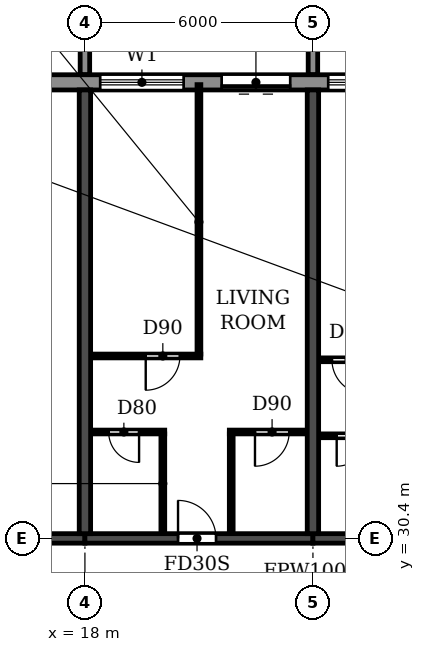
"""IFC4 building model, lengths in metres.
Left out: names, types, materials, properties, quantities, classifications, styles, units other than length and angle.
Written with IfcOpenShell. Run it as: python <this file> out.ifc"""

import sys

from ifc_helpers import new_model, si_unit, direction, frame, frame_2d, origin, place, context, subcontext, project, spatial, polyline, rectangle, outline, extrude, source, transform, mapped, element, fill, save


model = new_model("IFC4")
c1 = context("Model", 3, precision=1e-05, world=origin(), true_north=direction((0.0, 1.0)))
c2 = subcontext(c1, "Body", "Model", "MODEL_VIEW")
j1 = project(units=[si_unit("LENGTHUNIT", "METRE"), si_unit("PLANEANGLEUNIT", "RADIAN")], contexts=[c1])
p1 = place(None, origin())
s1 = spatial("IfcSite", under=j1, at=p1, CompositionType="ELEMENT")
p2 = place(p1, origin())
s2 = spatial("IfcBuilding", under=s1, at=p2, CompositionType="ELEMENT")
p3 = place(p2, frame((0.0, 0.0, 122.4)))
s3 = spatial("IfcBuildingStorey", under=s2, at=p3, CompositionType="ELEMENT", Elevation=122.4)
for number, where, z_axis, x_axis in (
    (1, (18.0, 30.525, 0.0), (0.0, 0.0, 1.0), (0.0, 1.0, 0.0)),
    (2, (24.0, 30.525, 0.0), (0.0, 0.0, 1.0), (0.0, 1.0, 0.0)),
):
    element("IfcWall", number, at=place(p3, frame(where, z_axis=z_axis, x_axis=x_axis)), inside=s3, PredefinedType="SHEAR", context=c2, shape_type="SweptSolid", body=[
        extrude(rectangle(XDim=11.675, YDim=0.3, at=frame_2d((5.837, 0.0))), origin(), (0.0, 0.0, 1.0), 3.07),
    ])
p4 = place(p3, frame((12.2, 30.4, 0.0), z_axis=(0.0, 0.0, 1.0), x_axis=(1.0, 0.0, 0.0)))
e3 = element("IfcWall", 3, at=p4, inside=s3, PredefinedType="SHEAR", context=c2, shape_type="SweptSolid", body=[
    extrude(rectangle(XDim=5.8, YDim=0.25, at=frame_2d((2.9, 0.0))), origin(), (0.0, 0.0, 1.0), 2.47),
])
p5 = place(p4, frame((2.3, 0.0, 0.0)))
e4 = element("IfcOpeningElement", 4, at=p5, cuts=e3, PredefinedType="OPENING", context=c2, shape_type="SweptSolid", body=[
    extrude(rectangle(XDim=1.0, YDim=2.1, at=frame_2d((0.5, 1.05))), frame((0.0, 0.135, 0.0), z_axis=(0.0, -1.0, 0.0), x_axis=(1.0, 0.0, 0.0)), (0.0, 0.0, 1.0), 0.27),
])
p6 = place(p3, frame((18.0, 30.4, 0.0), z_axis=(0.0, 0.0, 1.0), x_axis=(1.0, 0.0, 0.0)))
e5 = element("IfcWall", 5, at=p6, inside=s3, PredefinedType="SHEAR", context=c2, shape_type="SweptSolid", body=[
    extrude(rectangle(XDim=6.0, YDim=0.25, at=frame_2d((3.0, 0.0))), origin(), (0.0, 0.0, 1.0), 2.47),
])
p7 = place(p6, frame((2.45, 0.0, 0.0)))
e6 = element("IfcOpeningElement", 6, at=p7, cuts=e5, PredefinedType="OPENING", context=c2, shape_type="SweptSolid", body=[
    extrude(rectangle(XDim=1.0, YDim=2.1, at=frame_2d((0.5, 1.05))), frame((0.0, 0.135, 0.0), z_axis=(0.0, -1.0, 0.0), x_axis=(1.0, 0.0, 0.0)), (0.0, 0.0, 1.0), 0.27),
])
p8 = place(p3, frame((24.0, 30.4, 0.0), z_axis=(0.0, 0.0, 1.0), x_axis=(1.0, 0.0, 0.0)))
e7 = element("IfcWall", 7, at=p8, inside=s3, PredefinedType="SHEAR", context=c2, shape_type="SweptSolid", body=[
    extrude(rectangle(XDim=6.0, YDim=0.25, at=frame_2d((3.0, 0.0))), origin(), (0.0, 0.0, 1.0), 2.47),
])
p9 = place(p8, frame((2.45, 0.0, 0.0)))
e8 = element("IfcOpeningElement", 8, at=p9, cuts=e7, PredefinedType="OPENING", context=c2, shape_type="SweptSolid", body=[
    extrude(rectangle(XDim=1.0, YDim=2.1, at=frame_2d((0.5, 1.05))), frame((0.0, 0.135, 0.0), z_axis=(0.0, -1.0, 0.0), x_axis=(1.0, 0.0, 0.0)), (0.0, 0.0, 1.0), 0.27),
])
p10 = place(p3, frame((85.317, 42.4, 0.0), z_axis=(0.0, 0.0, 1.0), x_axis=(-1.0, 0.0, 0.0)))
e9 = element("IfcWall", 9, at=p10, inside=s3, PredefinedType="STANDARD", context=c2, shape_type="SweptSolid", body=[
    extrude(rectangle(XDim=68.634, YDim=0.4, at=frame_2d((34.317, 0.0))), origin(), (0.0, 0.0, 1.0), 3.07),
])
p11 = place(p10, frame((64.717, 0.0, 0.9)))
e10 = element("IfcOpeningElement", 10, at=p11, cuts=e9, PredefinedType="OPENING", context=c2, shape_type="SweptSolid", body=[
    extrude(rectangle(XDim=2.2, YDim=1.5, at=frame_2d((1.1, 0.75))), frame((0.0, 0.21, 0.0), z_axis=(0.0, -1.0, 0.0), x_axis=(1.0, 0.0, 0.0)), (0.0, 0.0, 1.0), 0.42),
])
p12 = place(p10, frame((61.917, 0.0, 0.0)))
e11 = element("IfcOpeningElement", 11, at=p12, cuts=e9, PredefinedType="OPENING", context=c2, shape_type="SweptSolid", body=[
    extrude(rectangle(XDim=1.8, YDim=2.4, at=frame_2d((0.9, 1.2))), frame((0.0, 0.21, 0.0), z_axis=(0.0, -1.0, 0.0), x_axis=(1.0, 0.0, 0.0)), (0.0, 0.0, 1.0), 0.42),
])
p13 = place(p10, frame((58.717, 0.0, 0.9)))
e12 = element("IfcOpeningElement", 12, at=p13, cuts=e9, PredefinedType="OPENING", context=c2, shape_type="SweptSolid", body=[
    extrude(rectangle(XDim=2.2, YDim=1.5, at=frame_2d((1.1, 0.75))), frame((0.0, 0.21, 0.0), z_axis=(0.0, -1.0, 0.0), x_axis=(1.0, 0.0, 0.0)), (0.0, 0.0, 1.0), 0.42),
])
p14 = place(p10, frame((55.917, 0.0, 0.0)))
e13 = element("IfcOpeningElement", 13, at=p14, cuts=e9, PredefinedType="OPENING", context=c2, shape_type="SweptSolid", body=[
    extrude(rectangle(XDim=1.8, YDim=2.4, at=frame_2d((0.9, 1.2))), frame((0.0, 0.21, 0.0), z_axis=(0.0, -1.0, 0.0), x_axis=(1.0, 0.0, 0.0)), (0.0, 0.0, 1.0), 0.42),
])
p15 = place(p10, frame((52.717, 0.0, 0.9)))
e14 = element("IfcOpeningElement", 14, at=p15, cuts=e9, PredefinedType="OPENING", context=c2, shape_type="SweptSolid", body=[
    extrude(rectangle(XDim=2.2, YDim=1.5, at=frame_2d((1.1, 0.75))), frame((0.0, 0.21, 0.0), z_axis=(0.0, -1.0, 0.0), x_axis=(1.0, 0.0, 0.0)), (0.0, 0.0, 1.0), 0.42),
])
p16 = place(p10, frame((49.917, 0.0, 0.0)))
e15 = element("IfcOpeningElement", 15, at=p16, cuts=e9, PredefinedType="OPENING", context=c2, shape_type="SweptSolid", body=[
    extrude(rectangle(XDim=1.8, YDim=2.4, at=frame_2d((0.9, 1.2))), frame((0.0, 0.21, 0.0), z_axis=(0.0, -1.0, 0.0), x_axis=(1.0, 0.0, 0.0)), (0.0, 0.0, 1.0), 0.42),
])
p17 = place(p10, frame((46.717, 0.0, 0.9)))
e16 = element("IfcOpeningElement", 16, at=p17, cuts=e9, PredefinedType="OPENING", context=c2, shape_type="SweptSolid", body=[
    extrude(rectangle(XDim=2.2, YDim=1.5, at=frame_2d((1.1, 0.75))), frame((0.0, 0.21, 0.0), z_axis=(0.0, -1.0, 0.0), x_axis=(1.0, 0.0, 0.0)), (0.0, 0.0, 1.0), 0.42),
])
p18 = place(p10, frame((43.917, 0.0, 0.0)))
e17 = element("IfcOpeningElement", 17, at=p18, cuts=e9, PredefinedType="OPENING", context=c2, shape_type="SweptSolid", body=[
    extrude(rectangle(XDim=1.8, YDim=2.4, at=frame_2d((0.9, 1.2))), frame((0.0, 0.21, 0.0), z_axis=(0.0, -1.0, 0.0), x_axis=(1.0, 0.0, 0.0)), (0.0, 0.0, 1.0), 0.42),
])
p19 = place(p10, frame((40.717, 0.0, 0.9)))
e18 = element("IfcOpeningElement", 18, at=p19, cuts=e9, PredefinedType="OPENING", context=c2, shape_type="SweptSolid", body=[
    extrude(rectangle(XDim=2.2, YDim=1.5, at=frame_2d((1.1, 0.75))), frame((0.0, 0.21, 0.0), z_axis=(0.0, -1.0, 0.0), x_axis=(1.0, 0.0, 0.0)), (0.0, 0.0, 1.0), 0.42),
])
p20 = place(p10, frame((37.717, 0.0, 0.9)))
e19 = element("IfcOpeningElement", 19, at=p20, cuts=e9, PredefinedType="OPENING", context=c2, shape_type="SweptSolid", body=[
    extrude(rectangle(XDim=2.2, YDim=1.5, at=frame_2d((1.1, 0.75))), frame((0.0, 0.21, 0.0), z_axis=(0.0, -1.0, 0.0), x_axis=(1.0, 0.0, 0.0)), (0.0, 0.0, 1.0), 0.42),
])
p21 = place(p10, frame((34.917, 0.0, 0.0)))
e20 = element("IfcOpeningElement", 20, at=p21, cuts=e9, PredefinedType="OPENING", context=c2, shape_type="SweptSolid", body=[
    extrude(rectangle(XDim=1.8, YDim=2.4, at=frame_2d((0.9, 1.2))), frame((0.0, 0.21, 0.0), z_axis=(0.0, -1.0, 0.0), x_axis=(1.0, 0.0, 0.0)), (0.0, 0.0, 1.0), 0.42),
])
p22 = place(p10, frame((31.717, 0.0, 0.9)))
e21 = element("IfcOpeningElement", 21, at=p22, cuts=e9, PredefinedType="OPENING", context=c2, shape_type="SweptSolid", body=[
    extrude(rectangle(XDim=2.2, YDim=1.5, at=frame_2d((1.1, 0.75))), frame((0.0, 0.21, 0.0), z_axis=(0.0, -1.0, 0.0), x_axis=(1.0, 0.0, 0.0)), (0.0, 0.0, 1.0), 0.42),
])
p23 = place(p10, frame((28.717, 0.0, 0.9)))
e22 = element("IfcOpeningElement", 22, at=p23, cuts=e9, PredefinedType="OPENING", context=c2, shape_type="SweptSolid", body=[
    extrude(rectangle(XDim=2.2, YDim=1.5, at=frame_2d((1.1, 0.75))), frame((0.0, 0.21, 0.0), z_axis=(0.0, -1.0, 0.0), x_axis=(1.0, 0.0, 0.0)), (0.0, 0.0, 1.0), 0.42),
])
p24 = place(p10, frame((25.717, 0.0, 0.9)))
e23 = element("IfcOpeningElement", 23, at=p24, cuts=e9, PredefinedType="OPENING", context=c2, shape_type="SweptSolid", body=[
    extrude(rectangle(XDim=2.2, YDim=1.5, at=frame_2d((1.1, 0.75))), frame((0.0, 0.21, 0.0), z_axis=(0.0, -1.0, 0.0), x_axis=(1.0, 0.0, 0.0)), (0.0, 0.0, 1.0), 0.42),
])
p25 = place(p10, frame((22.717, 0.0, 0.9)))
e24 = element("IfcOpeningElement", 24, at=p25, cuts=e9, PredefinedType="OPENING", context=c2, shape_type="SweptSolid", body=[
    extrude(rectangle(XDim=2.2, YDim=1.5, at=frame_2d((1.1, 0.75))), frame((0.0, 0.21, 0.0), z_axis=(0.0, -1.0, 0.0), x_axis=(1.0, 0.0, 0.0)), (0.0, 0.0, 1.0), 0.42),
])
p26 = place(p10, frame((19.917, 0.0, 0.0)))
e25 = element("IfcOpeningElement", 25, at=p26, cuts=e9, PredefinedType="OPENING", context=c2, shape_type="SweptSolid", body=[
    extrude(rectangle(XDim=1.8, YDim=2.4, at=frame_2d((0.9, 1.2))), frame((0.0, 0.21, 0.0), z_axis=(0.0, -1.0, 0.0), x_axis=(1.0, 0.0, 0.0)), (0.0, 0.0, 1.0), 0.42),
])
p27 = place(p10, frame((16.917, 0.0, 0.0)))
e26 = element("IfcOpeningElement", 26, at=p27, cuts=e9, PredefinedType="OPENING", context=c2, shape_type="SweptSolid", body=[
    extrude(rectangle(XDim=1.8, YDim=2.4, at=frame_2d((0.9, 1.2))), frame((0.0, 0.21, 0.0), z_axis=(0.0, -1.0, 0.0), x_axis=(1.0, 0.0, 0.0)), (0.0, 0.0, 1.0), 0.42),
])
p28 = place(p10, frame((13.717, 0.0, 0.9)))
e27 = element("IfcOpeningElement", 27, at=p28, cuts=e9, PredefinedType="OPENING", context=c2, shape_type="SweptSolid", body=[
    extrude(rectangle(XDim=2.2, YDim=1.5, at=frame_2d((1.1, 0.75))), frame((0.0, 0.21, 0.0), z_axis=(0.0, -1.0, 0.0), x_axis=(1.0, 0.0, 0.0)), (0.0, 0.0, 1.0), 0.42),
])
p29 = place(p10, frame((10.717, 0.0, 0.9)))
e28 = element("IfcOpeningElement", 28, at=p29, cuts=e9, PredefinedType="OPENING", context=c2, shape_type="SweptSolid", body=[
    extrude(rectangle(XDim=2.2, YDim=1.5, at=frame_2d((1.1, 0.75))), frame((0.0, 0.21, 0.0), z_axis=(0.0, -1.0, 0.0), x_axis=(1.0, 0.0, 0.0)), (0.0, 0.0, 1.0), 0.42),
])
p30 = place(p10, frame((7.717, 0.0, 0.9)))
e29 = element("IfcOpeningElement", 29, at=p30, cuts=e9, PredefinedType="OPENING", context=c2, shape_type="SweptSolid", body=[
    extrude(rectangle(XDim=2.2, YDim=1.5, at=frame_2d((1.1, 0.75))), frame((0.0, 0.21, 0.0), z_axis=(0.0, -1.0, 0.0), x_axis=(1.0, 0.0, 0.0)), (0.0, 0.0, 1.0), 0.42),
])
p31 = place(p10, frame((4.917, 0.0, 0.0)))
e30 = element("IfcOpeningElement", 30, at=p31, cuts=e9, PredefinedType="OPENING", context=c2, shape_type="SweptSolid", body=[
    extrude(rectangle(XDim=1.8, YDim=2.4, at=frame_2d((0.9, 1.2))), frame((0.0, 0.21, 0.0), z_axis=(0.0, -1.0, 0.0), x_axis=(1.0, 0.0, 0.0)), (0.0, 0.0, 1.0), 0.42),
])
p32 = place(p10, frame((1.717, 0.0, 0.9)))
e31 = element("IfcOpeningElement", 31, at=p32, cuts=e9, PredefinedType="OPENING", context=c2, shape_type="SweptSolid", body=[
    extrude(rectangle(XDim=2.2, YDim=1.5, at=frame_2d((1.1, 0.75))), frame((0.0, 0.21, 0.0), z_axis=(0.0, -1.0, 0.0), x_axis=(1.0, 0.0, 0.0)), (0.0, 0.0, 1.0), 0.42),
])
m1 = source(origin(), c2, "Body", "SweptSolid", [
    extrude(outline(polyline([(0.0, 0.0), (0.25, 0.0), (0.25, 3.1), (0.0, 3.1), (0.0, 0.0)])), origin(), (0.0, 0.0, 1.0), 3.1),
])
for number, where in (
    (32, (17.875, 42.6, 0.0)),
    (33, (23.875, 42.6, 0.0)),
):
    element("IfcWall", number, at=place(p3, frame(where)), inside=s3, PredefinedType="STANDARD", context=c2, shape_type="MappedRepresentation", body=[
        mapped(m1, transform((0.0, 0.0, 0.0))),
    ])
p33 = place(p3, frame((24.16, 33.1, 0.0), z_axis=(0.0, 0.0, 1.0), x_axis=(1.0, 0.0, 0.0)))
e34 = element("IfcWall", 34, at=p33, inside=s3, PredefinedType="PARTITIONING", context=c2, shape_type="SweptSolid", body=[
    extrude(rectangle(XDim=1.94, YDim=0.1, at=frame_2d((0.97, 0.0))), origin(), (0.0, 0.0, 1.0), 3.07),
])
p34 = place(p33, frame((0.465, 0.0, 0.0)))
e35 = element("IfcOpeningElement", 35, at=p34, cuts=e34, PredefinedType="OPENING", context=c2, shape_type="SweptSolid", body=[
    extrude(rectangle(XDim=0.8, YDim=2.1, at=frame_2d((0.4, 1.05))), frame((0.0, 0.06, 0.0), z_axis=(0.0, -1.0, 0.0), x_axis=(1.0, 0.0, 0.0)), (0.0, 0.0, 1.0), 0.12),
])
p35 = place(p3, frame((18.16, 33.2, 0.0), z_axis=(0.0, 0.0, 1.0), x_axis=(1.0, 0.0, 0.0)))
e36 = element("IfcWall", 36, at=p35, inside=s3, PredefinedType="PARTITIONING", context=c2, shape_type="SweptSolid", body=[
    extrude(rectangle(XDim=1.94, YDim=0.1, at=frame_2d((0.97, 0.0))), origin(), (0.0, 0.0, 1.0), 3.07),
])
p36 = place(p35, frame((0.465, 0.0, 0.0)))
e37 = element("IfcOpeningElement", 37, at=p36, cuts=e36, PredefinedType="OPENING", context=c2, shape_type="SweptSolid", body=[
    extrude(rectangle(XDim=0.8, YDim=2.1, at=frame_2d((0.4, 1.05))), frame((0.0, 0.06, 0.0), z_axis=(0.0, -1.0, 0.0), x_axis=(1.0, 0.0, 0.0)), (0.0, 0.0, 1.0), 0.12),
])
p37 = place(p3, frame((21.8, 33.2, 0.0), z_axis=(0.0, 0.0, 1.0), x_axis=(1.0, 0.0, 0.0)))
e38 = element("IfcWall", 38, at=p37, inside=s3, PredefinedType="PARTITIONING", context=c2, shape_type="SweptSolid", body=[
    extrude(rectangle(XDim=2.04, YDim=0.1, at=frame_2d((1.02, 0.0))), origin(), (0.0, 0.0, 1.0), 3.07),
])
p38 = place(p37, frame((0.675, 0.0, 0.0)))
e39 = element("IfcOpeningElement", 39, at=p38, cuts=e38, PredefinedType="OPENING", context=c2, shape_type="SweptSolid", body=[
    extrude(rectangle(XDim=0.9, YDim=2.1, at=frame_2d((0.45, 1.05))), frame((0.0, 0.06, 0.0), z_axis=(0.0, -1.0, 0.0), x_axis=(1.0, 0.0, 0.0)), (0.0, 0.0, 1.0), 0.12),
])
p39 = place(p3, frame((24.16, 35.1, 0.0), z_axis=(0.0, 0.0, 1.0), x_axis=(1.0, 0.0, 0.0)))
e40 = element("IfcWall", 40, at=p39, inside=s3, PredefinedType="PARTITIONING", context=c2, shape_type="SweptSolid", body=[
    extrude(rectangle(XDim=2.89, YDim=0.1, at=frame_2d((1.445, 0.0))), origin(), (0.0, 0.0, 1.0), 3.07),
])
p40 = place(p39, frame((0.34, 0.0, 0.0)))
e41 = element("IfcOpeningElement", 41, at=p40, cuts=e40, PredefinedType="OPENING", context=c2, shape_type="SweptSolid", body=[
    extrude(rectangle(XDim=0.9, YDim=2.1, at=frame_2d((0.45, 1.05))), frame((0.0, 0.06, 0.0), z_axis=(0.0, -1.0, 0.0), x_axis=(1.0, 0.0, 0.0)), (0.0, 0.0, 1.0), 0.12),
])
p41 = place(p3, frame((18.16, 35.2, 0.0), z_axis=(0.0, 0.0, 1.0), x_axis=(1.0, 0.0, 0.0)))
e42 = element("IfcWall", 42, at=p41, inside=s3, PredefinedType="PARTITIONING", context=c2, shape_type="SweptSolid", body=[
    extrude(rectangle(XDim=2.89, YDim=0.1, at=frame_2d((1.445, 0.0))), origin(), (0.0, 0.0, 1.0), 3.07),
])
p42 = place(p41, frame((1.44, 0.0, 0.0)))
e43 = element("IfcOpeningElement", 43, at=p42, cuts=e42, PredefinedType="OPENING", context=c2, shape_type="SweptSolid", body=[
    extrude(rectangle(XDim=0.9, YDim=2.1, at=frame_2d((0.45, 1.05))), frame((0.0, 0.06, 0.0), z_axis=(0.0, -1.0, 0.0), x_axis=(1.0, 0.0, 0.0)), (0.0, 0.0, 1.0), 0.12),
])
p43 = place(p3, frame((20.05, 30.535, 0.0), z_axis=(0.0, 0.0, 1.0), x_axis=(0.0, 1.0, 0.0)))
e44 = element("IfcWall", 44, at=p43, inside=s3, PredefinedType="PARTITIONING", context=c2, shape_type="SweptSolid", body=[
    extrude(rectangle(XDim=2.615, YDim=0.1, at=frame_2d((1.308, 0.0))), origin(), (0.0, 0.0, 1.0), 3.07),
])
p44 = place(p3, frame((21.0, 35.25, 0.0), z_axis=(0.0, 0.0, 1.0), x_axis=(0.0, 1.0, 0.0)))
e45 = element("IfcWall", 45, at=p44, inside=s3, PredefinedType="PARTITIONING", context=c2, shape_type="SweptSolid", body=[
    extrude(rectangle(XDim=7.09, YDim=0.1, at=frame_2d((3.545, 0.0))), origin(), (0.0, 0.0, 1.0), 3.07),
])
p45 = place(p3, frame((21.85, 30.535, 0.0), z_axis=(0.0, 0.0, 1.0), x_axis=(0.0, 1.0, 0.0)))
e46 = element("IfcWall", 46, at=p45, inside=s3, PredefinedType="PARTITIONING", context=c2, shape_type="SweptSolid", body=[
    extrude(rectangle(XDim=2.615, YDim=0.1, at=frame_2d((1.308, 0.0))), origin(), (0.0, 0.0, 1.0), 3.07),
])
p46 = place(p11, origin())
e47 = element("IfcWindow", 47, at=p46, inside=s3, PartitioningType="DOUBLE_PANEL_HORIZONTAL", PredefinedType="WINDOW", context=c2, shape_type="SweptSolid", body=[
    extrude(rectangle(XDim=2.2, YDim=1.5, at=frame_2d((1.1, 0.75))), frame((0.0, 0.03, 0.0), z_axis=(0.0, -1.0, 0.0), x_axis=(1.0, 0.0, 0.0)), (0.0, 0.0, 1.0), 0.06),
])
fill(e10, e47)
p47 = place(p12, origin())
e48 = element("IfcDoor", 48, at=p47, inside=s3, OperationType="DOUBLE_DOOR_SLIDING", PredefinedType="DOOR", context=c2, shape_type="SweptSolid", body=[
    extrude(rectangle(XDim=1.8, YDim=2.4, at=frame_2d((0.9, 1.2))), frame((0.0, 0.025, 0.0), z_axis=(0.0, -1.0, 0.0), x_axis=(1.0, 0.0, 0.0)), (0.0, 0.0, 1.0), 0.05),
])
fill(e11, e48)
p48 = place(p13, origin())
e49 = element("IfcWindow", 49, at=p48, inside=s3, PartitioningType="DOUBLE_PANEL_HORIZONTAL", PredefinedType="WINDOW", context=c2, shape_type="SweptSolid", body=[
    extrude(rectangle(XDim=2.2, YDim=1.5, at=frame_2d((1.1, 0.75))), frame((0.0, 0.03, 0.0), z_axis=(0.0, -1.0, 0.0), x_axis=(1.0, 0.0, 0.0)), (0.0, 0.0, 1.0), 0.06),
])
fill(e12, e49)
p49 = place(p36, frame((0.8, 0.0, 0.0), z_axis=(0.0, 0.0, 1.0), x_axis=(-1.0, 0.0, 0.0)))
e50 = element("IfcDoor", 50, at=p49, inside=s3, OperationType="SINGLE_SWING_LEFT", PredefinedType="DOOR", context=c2, shape_type="SweptSolid", body=[
    extrude(rectangle(XDim=0.8, YDim=2.1, at=frame_2d((0.4, 1.05))), frame((0.0, 0.025, 0.0), z_axis=(0.0, -1.0, 0.0), x_axis=(1.0, 0.0, 0.0)), (0.0, 0.0, 1.0), 0.05),
])
fill(e37, e50)
p50 = place(p42, frame((0.9, 0.0, 0.0), z_axis=(0.0, 0.0, 1.0), x_axis=(-1.0, 0.0, 0.0)))
e51 = element("IfcDoor", 51, at=p50, inside=s3, OperationType="SINGLE_SWING_RIGHT", PredefinedType="DOOR", context=c2, shape_type="SweptSolid", body=[
    extrude(rectangle(XDim=0.9, YDim=2.1, at=frame_2d((0.45, 1.05))), frame((0.0, 0.025, 0.0), z_axis=(0.0, -1.0, 0.0), x_axis=(1.0, 0.0, 0.0)), (0.0, 0.0, 1.0), 0.05),
])
fill(e43, e51)
p51 = place(p7, origin())
e52 = element("IfcDoor", 52, at=p51, inside=s3, OperationType="SINGLE_SWING_LEFT", PredefinedType="DOOR", context=c2, shape_type="SweptSolid", body=[
    extrude(rectangle(XDim=1.0, YDim=2.1, at=frame_2d((0.5, 1.05))), frame((0.0, 0.025, 0.0), z_axis=(0.0, -1.0, 0.0), x_axis=(1.0, 0.0, 0.0)), (0.0, 0.0, 1.0), 0.05),
])
fill(e6, e52)
p52 = place(p38, frame((0.9, 0.0, 0.0), z_axis=(0.0, 0.0, 1.0), x_axis=(-1.0, 0.0, 0.0)))
e53 = element("IfcDoor", 53, at=p52, inside=s3, OperationType="SINGLE_SWING_RIGHT", PredefinedType="DOOR", context=c2, shape_type="SweptSolid", body=[
    extrude(rectangle(XDim=0.9, YDim=2.1, at=frame_2d((0.45, 1.05))), frame((0.0, 0.025, 0.0), z_axis=(0.0, -1.0, 0.0), x_axis=(1.0, 0.0, 0.0)), (0.0, 0.0, 1.0), 0.05),
])
fill(e39, e53)
p53 = place(p40, frame((0.9, 0.0, 0.0), z_axis=(0.0, 0.0, 1.0), x_axis=(-1.0, 0.0, 0.0)))
e54 = element("IfcDoor", 54, at=p53, inside=s3, OperationType="SINGLE_SWING_LEFT", PredefinedType="DOOR", context=c2, shape_type="SweptSolid", body=[
    extrude(rectangle(XDim=0.9, YDim=2.1, at=frame_2d((0.45, 1.05))), frame((0.0, 0.025, 0.0), z_axis=(0.0, -1.0, 0.0), x_axis=(1.0, 0.0, 0.0)), (0.0, 0.0, 1.0), 0.05),
])
fill(e41, e54)
p54 = place(p34, frame((0.8, 0.0, 0.0), z_axis=(0.0, 0.0, 1.0), x_axis=(-1.0, 0.0, 0.0)))
e55 = element("IfcDoor", 55, at=p54, inside=s3, OperationType="SINGLE_SWING_RIGHT", PredefinedType="DOOR", context=c2, shape_type="SweptSolid", body=[
    extrude(rectangle(XDim=0.8, YDim=2.1, at=frame_2d((0.4, 1.05))), frame((0.0, 0.025, 0.0), z_axis=(0.0, -1.0, 0.0), x_axis=(1.0, 0.0, 0.0)), (0.0, 0.0, 1.0), 0.05),
])
fill(e35, e55)
save(model, sys.argv[1])
